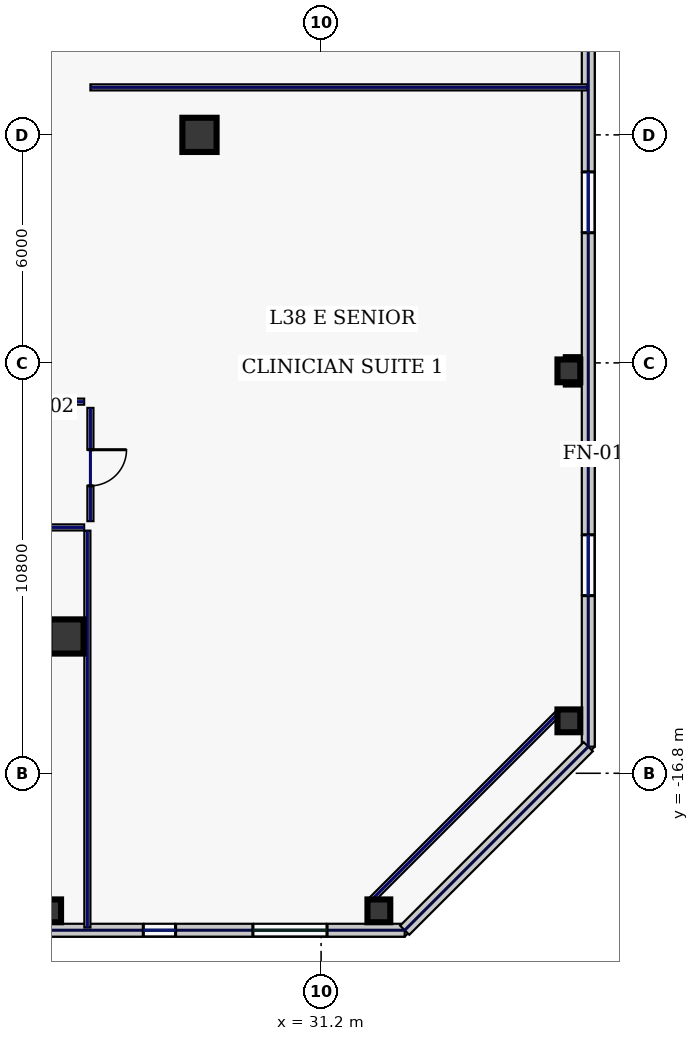
"""IFC4 building model, lengths in metres.
Left out: names, types, materials, properties, quantities, classifications, styles, units other than length and angle.
Written with IfcOpenShell. Run it as: python <this file> out.ifc"""

import sys

from ifc_helpers import new_model, si_unit, direction, frame, frame_2d, origin, origin_2d, place, context, subcontext, project, spatial, rectangle, hollow_rectangle, extrude, element, fill, save


model = new_model("IFC4")
c1 = context("Model", 3, precision=1e-05, world=origin(), true_north=direction((0.0, 1.0)))
c2 = subcontext(c1, "Body", "Model", "MODEL_VIEW")
j1 = project(units=[si_unit("LENGTHUNIT", "METRE"), si_unit("PLANEANGLEUNIT", "RADIAN")], contexts=[c1])
p1 = place(None, origin())
s1 = spatial("IfcSite", under=j1, at=p1, CompositionType="ELEMENT")
p2 = place(p1, origin())
s2 = spatial("IfcBuilding", under=s1, at=p2, CompositionType="ELEMENT")
p3 = place(p2, frame((0.0, 0.0, 168.2)))
s3 = spatial("IfcBuildingStorey", under=s2, at=p3, CompositionType="ELEMENT", Elevation=168.2)
for number, where, z_axis, x_axis in (
    (1, (24.5, -13.2, 0.0), (0.0, 0.0, 1.0), (1.0, 0.0, 0.0)),
    (2, (28.0, 0.0, 0.0), (0.0, 0.0, 1.0), (1.0, 0.0, 0.0)),
):
    element("IfcColumn", number, at=place(p3, frame(where, z_axis=z_axis, x_axis=x_axis)), inside=s3, PredefinedType="COLUMN", context=c2, shape_type="SweptSolid", body=[
        extrude(hollow_rectangle(XDim=0.9, YDim=0.9, WallThickness=0.04, at=origin_2d()), origin(), (0.0, 0.0, 1.0), 3.74),
    ])
for number, where, z_axis, x_axis in (
    (3, (24.057, -20.42, 0.0), (0.0, 0.0, 1.0), (1.0, 0.0, 0.0)),
    (4, (32.72, -20.42, 0.0), (0.0, 0.0, 1.0), (1.0, 0.0, 0.0)),
    (5, (37.72, -15.42, 0.0), (0.0, 0.0, 1.0), (1.0, 0.0, 0.0)),
    (6, (37.72, -6.21, 0.0), (0.0, 0.0, 1.0), (1.0, 0.0, 0.0)),
):
    element("IfcColumn", number, at=place(p3, frame(where, z_axis=z_axis, x_axis=x_axis)), inside=s3, PredefinedType="COLUMN", context=c2, shape_type="SweptSolid", body=[
        extrude(hollow_rectangle(XDim=0.6, YDim=0.6, WallThickness=0.028, at=origin_2d()), origin(), (0.0, 0.0, 1.0), 3.74),
    ])
p4 = place(p3, frame((13.463, -20.93, 0.0), z_axis=(0.0, 0.0, 1.0), x_axis=(1.0, 0.0, 0.0)))
e7 = element("IfcWall", 7, at=p4, inside=s3, PredefinedType="STANDARD", context=c2, shape_type="SweptSolid", body=[
    extrude(rectangle(XDim=19.937, YDim=0.34, at=frame_2d((9.969, 0.0))), origin(), (0.0, 0.0, 1.0), 3.74),
])
p5 = place(p4, frame((3.295, 0.0, 0.8)))
e8 = element("IfcOpeningElement", 8, at=p5, cuts=e7, PredefinedType="OPENING", context=c2, shape_type="SweptSolid", body=[
    extrude(rectangle(XDim=0.85, YDim=1.85, at=frame_2d((0.425, 0.925))), frame((0.0, 0.18, 0.0), z_axis=(0.0, -1.0, 0.0), x_axis=(1.0, 0.0, 0.0)), (0.0, 0.0, 1.0), 0.36),
])
p6 = place(p4, frame((7.28, 0.0, 0.8)))
e9 = element("IfcOpeningElement", 9, at=p6, cuts=e7, PredefinedType="OPENING", context=c2, shape_type="SweptSolid", body=[
    extrude(rectangle(XDim=1.95, YDim=2.1, at=frame_2d((0.975, 1.05))), frame((0.0, 0.18, 0.0), z_axis=(0.0, -1.0, 0.0), x_axis=(1.0, 0.0, 0.0)), (0.0, 0.0, 1.0), 0.36),
])
p7 = place(p4, frame((13.058, 0.0, 0.8)))
e10 = element("IfcOpeningElement", 10, at=p7, cuts=e7, PredefinedType="OPENING", context=c2, shape_type="SweptSolid", body=[
    extrude(rectangle(XDim=0.85, YDim=1.85, at=frame_2d((0.425, 0.925))), frame((0.0, 0.18, 0.0), z_axis=(0.0, -1.0, 0.0), x_axis=(1.0, 0.0, 0.0)), (0.0, 0.0, 1.0), 0.36),
])
p8 = place(p4, frame((15.943, 0.0, 0.8)))
e11 = element("IfcOpeningElement", 11, at=p8, cuts=e7, PredefinedType="OPENING", context=c2, shape_type="SweptSolid", body=[
    extrude(rectangle(XDim=1.95, YDim=2.1, at=frame_2d((0.975, 1.05))), frame((0.0, 0.18, 0.0), z_axis=(0.0, -1.0, 0.0), x_axis=(1.0, 0.0, 0.0)), (0.0, 0.0, 1.0), 0.36),
])
p9 = place(p3, frame((38.23, -16.1, 0.0), z_axis=(0.0, 0.0, 1.0), x_axis=(0.0, 1.0, 0.0)))
e12 = element("IfcWall", 12, at=p9, inside=s3, PredefinedType="STANDARD", context=c2, shape_type="SweptSolid", body=[
    extrude(rectangle(XDim=38.2, YDim=0.34, at=frame_2d((19.1, 0.0))), origin(), (0.0, 0.0, 1.0), 3.74),
])
p10 = place(p9, frame((3.975, 0.0, 0.58)))
e13 = element("IfcOpeningElement", 13, at=p10, cuts=e12, PredefinedType="OPENING", context=c2, shape_type="SweptSolid", body=[
    extrude(rectangle(XDim=1.6, YDim=2.3, at=frame_2d((0.8, 1.15))), frame((0.0, 0.18, 0.0), z_axis=(0.0, -1.0, 0.0), x_axis=(1.0, 0.0, 0.0)), (0.0, 0.0, 1.0), 0.36),
])
p11 = place(p9, frame((13.525, 0.0, 0.58)))
e14 = element("IfcOpeningElement", 14, at=p11, cuts=e12, PredefinedType="OPENING", context=c2, shape_type="SweptSolid", body=[
    extrude(rectangle(XDim=1.6, YDim=2.3, at=frame_2d((0.8, 1.15))), frame((0.0, 0.18, 0.0), z_axis=(0.0, -1.0, 0.0), x_axis=(1.0, 0.0, 0.0)), (0.0, 0.0, 1.0), 0.36),
])
p12 = place(p9, frame((23.075, 0.0, 0.58)))
e15 = element("IfcOpeningElement", 15, at=p12, cuts=e12, PredefinedType="OPENING", context=c2, shape_type="SweptSolid", body=[
    extrude(rectangle(XDim=1.6, YDim=2.3, at=frame_2d((0.8, 1.15))), frame((0.0, 0.18, 0.0), z_axis=(0.0, -1.0, 0.0), x_axis=(1.0, 0.0, 0.0)), (0.0, 0.0, 1.0), 0.36),
])
p13 = place(p9, frame((32.625, 0.0, 0.58)))
e16 = element("IfcOpeningElement", 16, at=p13, cuts=e12, PredefinedType="OPENING", context=c2, shape_type="SweptSolid", body=[
    extrude(rectangle(XDim=1.6, YDim=2.3, at=frame_2d((0.8, 1.15))), frame((0.0, 0.18, 0.0), z_axis=(0.0, -1.0, 0.0), x_axis=(1.0, 0.0, 0.0)), (0.0, 0.0, 1.0), 0.36),
])
p14 = place(p3, frame((33.4, -20.93, 0.0), z_axis=(0.0, 0.0, 1.0), x_axis=(0.707124652085, 0.707088909836, 0.0)))
e17 = element("IfcWall", 17, at=p14, inside=s3, PredefinedType="STANDARD", context=c2, shape_type="SweptSolid", body=[
    extrude(rectangle(XDim=6.831, YDim=0.34, at=frame_2d((3.415, 0.0))), origin(), (0.0, 0.0, 1.0), 3.74),
])
p15 = place(p3, frame((32.479, -20.18, 0.0), z_axis=(0.0, 0.0, 1.0), x_axis=(0.707106781187, 0.707106781187, 0.0)))
e18 = element("IfcWall", 18, at=p15, inside=s3, PredefinedType="PARTITIONING", context=c2, shape_type="SweptSolid", body=[
    extrude(rectangle(XDim=7.071, YDim=0.16, at=frame_2d((3.536, 0.0))), origin(), (0.0, 0.0, 1.0), 3.74),
])
p16 = place(p3, frame((10.715, -7.02, 0.0), z_axis=(0.0, 0.0, 1.0), x_axis=(1.0, 0.0, 0.0)))
e19 = element("IfcWall", 19, at=p16, inside=s3, PredefinedType="PARTITIONING", context=c2, shape_type="SweptSolid", body=[
    extrude(rectangle(XDim=14.25, YDim=0.16, at=frame_2d((7.125, 0.0))), origin(), (0.0, 0.0, 1.0), 3.74),
])
p17 = place(p3, frame((25.13, -7.185, 0.0), z_axis=(0.0, 0.0, 1.0), x_axis=(0.0, -1.0, 0.0)))
e20 = element("IfcWall", 20, at=p17, inside=s3, PredefinedType="PARTITIONING", context=c2, shape_type="SweptSolid", body=[
    extrude(rectangle(XDim=2.98, YDim=0.16, at=frame_2d((1.49, 0.0))), origin(), (0.0, 0.0, 1.0), 3.74),
])
p18 = place(p17, frame((1.1, 0.0, 0.0)))
e21 = element("IfcOpeningElement", 21, at=p18, cuts=e20, PredefinedType="OPENING", context=c2, shape_type="SweptSolid", body=[
    extrude(rectangle(XDim=0.95, YDim=2.2, at=frame_2d((0.475, 1.1))), frame((0.0, 0.09, 0.0), z_axis=(0.0, -1.0, 0.0), x_axis=(1.0, 0.0, 0.0)), (0.0, 0.0, 1.0), 0.18),
])
p19 = place(p3, frame((24.965, -10.33, 0.0), z_axis=(0.0, 0.0, 1.0), x_axis=(-1.0, 0.0, 0.0)))
e22 = element("IfcWall", 22, at=p19, inside=s3, PredefinedType="PARTITIONING", context=c2, shape_type="SweptSolid", body=[
    extrude(rectangle(XDim=49.93, YDim=0.16, at=frame_2d((24.965, 0.0))), origin(), (0.0, 0.0, 1.0), 3.74),
])
p20 = place(p19, frame((47.106, 0.0, 0.0)))
e23 = element("IfcOpeningElement", 23, at=p20, cuts=e22, PredefinedType="OPENING", context=c2, shape_type="SweptSolid", body=[
    extrude(rectangle(XDim=0.95, YDim=2.2, at=frame_2d((0.475, 1.1))), frame((0.0, 0.09, 0.0), z_axis=(0.0, -1.0, 0.0), x_axis=(1.0, 0.0, 0.0)), (0.0, 0.0, 1.0), 0.18),
])
p21 = place(p19, frame((41.855, 0.0, 0.0)))
e24 = element("IfcOpeningElement", 24, at=p21, cuts=e22, PredefinedType="OPENING", context=c2, shape_type="SweptSolid", body=[
    extrude(rectangle(XDim=1.15, YDim=2.2, at=frame_2d((0.575, 1.1))), frame((0.0, 0.09, 0.0), z_axis=(0.0, -1.0, 0.0), x_axis=(1.0, 0.0, 0.0)), (0.0, 0.0, 1.0), 0.18),
])
p22 = place(p19, frame((35.18, 0.0, 0.0)))
e25 = element("IfcOpeningElement", 25, at=p22, cuts=e22, PredefinedType="OPENING", context=c2, shape_type="SweptSolid", body=[
    extrude(rectangle(XDim=1.3, YDim=2.2, at=frame_2d((0.65, 1.1))), frame((0.0, 0.09, 0.0), z_axis=(0.0, -1.0, 0.0), x_axis=(1.0, 0.0, 0.0)), (0.0, 0.0, 1.0), 0.18),
])
p23 = place(p19, frame((27.37, 0.0, 0.0)))
e26 = element("IfcOpeningElement", 26, at=p23, cuts=e22, PredefinedType="OPENING", context=c2, shape_type="SweptSolid", body=[
    extrude(rectangle(XDim=1.05, YDim=2.2, at=frame_2d((0.525, 1.1))), frame((0.0, 0.09, 0.0), z_axis=(0.0, -1.0, 0.0), x_axis=(1.0, 0.0, 0.0)), (0.0, 0.0, 1.0), 0.18),
])
p24 = place(p19, frame((18.72, 0.0, 0.0)))
e27 = element("IfcOpeningElement", 27, at=p24, cuts=e22, PredefinedType="OPENING", context=c2, shape_type="SweptSolid", body=[
    extrude(rectangle(XDim=0.95, YDim=2.2, at=frame_2d((0.475, 1.1))), frame((0.0, 0.09, 0.0), z_axis=(0.0, -1.0, 0.0), x_axis=(1.0, 0.0, 0.0)), (0.0, 0.0, 1.0), 0.18),
])
p25 = place(p19, frame((10.425, 0.0, 0.0)))
e28 = element("IfcOpeningElement", 28, at=p25, cuts=e22, PredefinedType="OPENING", context=c2, shape_type="SweptSolid", body=[
    extrude(rectangle(XDim=0.95, YDim=2.2, at=frame_2d((0.475, 1.1))), frame((0.0, 0.09, 0.0), z_axis=(0.0, -1.0, 0.0), x_axis=(1.0, 0.0, 0.0)), (0.0, 0.0, 1.0), 0.18),
])
p26 = place(p19, frame((3.044, 0.0, 0.0)))
e29 = element("IfcOpeningElement", 29, at=p26, cuts=e22, PredefinedType="OPENING", context=c2, shape_type="SweptSolid", body=[
    extrude(rectangle(XDim=0.95, YDim=2.2, at=frame_2d((0.475, 1.1))), frame((0.0, 0.09, 0.0), z_axis=(0.0, -1.0, 0.0), x_axis=(1.0, 0.0, 0.0)), (0.0, 0.0, 1.0), 0.18),
])
p27 = place(p3, frame((25.05, -20.86, 0.0), z_axis=(0.0, 0.0, 1.0), x_axis=(0.0, 1.0, 0.0)))
e30 = element("IfcWall", 30, at=p27, inside=s3, PredefinedType="PARTITIONING", context=c2, shape_type="SweptSolid", body=[
    extrude(rectangle(XDim=10.445, YDim=0.16, at=frame_2d((5.223, 0.0))), origin(), (0.0, 0.0, 1.0), 3.74),
])
p28 = place(p3, frame((25.13, 1.25, 0.0), z_axis=(0.0, 0.0, 1.0), x_axis=(1.0, 0.0, 0.0)))
e31 = element("IfcWall", 31, at=p28, inside=s3, PredefinedType="PARTITIONING", context=c2, shape_type="SweptSolid", body=[
    extrude(rectangle(XDim=13.08, YDim=0.16, at=frame_2d((6.54, 0.0))), origin(), (0.0, 0.0, 1.0), 3.285),
])
p29 = place(p7, origin())
e32 = element("IfcWindow", 32, at=p29, inside=s3, PartitioningType="SINGLE_PANEL", PredefinedType="WINDOW", context=c2, shape_type="SweptSolid", body=[
    extrude(rectangle(XDim=0.85, YDim=1.85, at=frame_2d((0.425, 0.925))), frame((0.0, 0.03, 0.0), z_axis=(0.0, -1.0, 0.0), x_axis=(1.0, 0.0, 0.0)), (0.0, 0.0, 1.0), 0.06),
])
fill(e10, e32)
p30 = place(p8, origin())
e33 = element("IfcWindow", 33, at=p30, inside=s3, PartitioningType="SINGLE_PANEL", PredefinedType="WINDOW", context=c2, shape_type="SweptSolid", body=[
    extrude(rectangle(XDim=1.95, YDim=2.1, at=frame_2d((0.975, 1.05))), frame((0.0, 0.03, 0.0), z_axis=(0.0, -1.0, 0.0), x_axis=(1.0, 0.0, 0.0)), (0.0, 0.0, 1.0), 0.06),
])
fill(e11, e33)
p31 = place(p10, origin())
e34 = element("IfcWindow", 34, at=p31, inside=s3, PartitioningType="SINGLE_PANEL", PredefinedType="WINDOW", context=c2, shape_type="SweptSolid", body=[
    extrude(rectangle(XDim=1.6, YDim=2.3, at=frame_2d((0.8, 1.15))), frame((0.0, 0.03, 0.0), z_axis=(0.0, -1.0, 0.0), x_axis=(1.0, 0.0, 0.0)), (0.0, 0.0, 1.0), 0.06),
])
fill(e13, e34)
p32 = place(p11, origin())
e35 = element("IfcWindow", 35, at=p32, inside=s3, PartitioningType="SINGLE_PANEL", PredefinedType="WINDOW", context=c2, shape_type="SweptSolid", body=[
    extrude(rectangle(XDim=1.6, YDim=2.3, at=frame_2d((0.8, 1.15))), frame((0.0, 0.03, 0.0), z_axis=(0.0, -1.0, 0.0), x_axis=(1.0, 0.0, 0.0)), (0.0, 0.0, 1.0), 0.06),
])
fill(e14, e35)
p33 = place(p18, origin())
e36 = element("IfcDoor", 36, at=p33, inside=s3, OperationType="SINGLE_SWING_LEFT", PredefinedType="DOOR", context=c2, shape_type="SweptSolid", body=[
    extrude(rectangle(XDim=0.95, YDim=2.2, at=frame_2d((0.475, 1.1))), frame((0.0, 0.025, 0.0), z_axis=(0.0, -1.0, 0.0), x_axis=(1.0, 0.0, 0.0)), (0.0, 0.0, 1.0), 0.05),
])
fill(e21, e36)
save(model, sys.argv[1])
